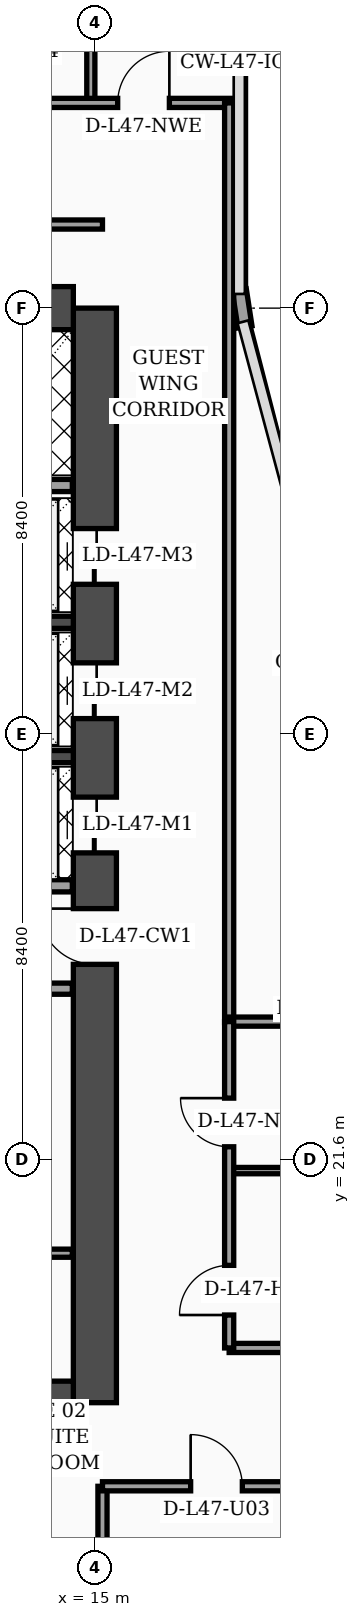
"""IFC4 building model, lengths in metres.
Left out: names, types, materials, properties, quantities, classifications, styles, units other than length and angle.
Written with IfcOpenShell. Run it as: python <this file> out.ifc"""

import sys

from ifc_helpers import new_model, si_unit, direction, frame, frame_2d, origin, place, context, subcontext, project, spatial, rectangle, extrude, element, fill, save


model = new_model("IFC4")
c1 = context("Model", 3, precision=1e-05, world=origin(), true_north=direction((0.0, 1.0)))
c2 = subcontext(c1, "Body", "Model", "MODEL_VIEW")
j1 = project(units=[si_unit("LENGTHUNIT", "METRE"), si_unit("PLANEANGLEUNIT", "RADIAN")], contexts=[c1])
p1 = place(None, origin())
s1 = spatial("IfcSite", under=j1, at=p1, CompositionType="ELEMENT")
p2 = place(p1, origin())
s2 = spatial("IfcBuilding", under=s1, at=p2, CompositionType="ELEMENT")
p3 = place(p2, frame((0.0, 0.0, 191.3)))
s3 = spatial("IfcBuildingStorey", under=s2, at=p3, CompositionType="ELEMENT", Elevation=191.3)
p4 = place(p3, frame((15.0, 16.8, 0.0), z_axis=(0.0, 0.0, 1.0), x_axis=(0.0, 1.0, 0.0)))
e1 = element("IfcWall", 1, at=p4, inside=s3, PredefinedType="SHEAR", context=c2, shape_type="SweptSolid", body=[
    extrude(rectangle(XDim=21.6, YDim=0.85, at=frame_2d((10.8, 0.0))), origin(), (0.0, 0.0, 1.0), 3.56),
])
p5 = place(p4, frame((8.65, 0.0, 0.0)))
e2 = element("IfcOpeningElement", 2, at=p5, cuts=e1, PredefinedType="OPENING", context=c2, shape_type="SweptSolid", body=[
    extrude(rectangle(XDim=1.1, YDim=2.2, at=frame_2d((0.55, 1.1))), frame((0.0, 0.435, 0.0), z_axis=(0.0, -1.0, 0.0), x_axis=(1.0, 0.0, 0.0)), (0.0, 0.0, 1.0), 0.87),
])
p6 = place(p4, frame((10.85, 0.0, 0.0)))
e3 = element("IfcOpeningElement", 3, at=p6, cuts=e1, PredefinedType="OPENING", context=c2, shape_type="SweptSolid", body=[
    extrude(rectangle(XDim=1.1, YDim=2.2, at=frame_2d((0.55, 1.1))), frame((0.0, 0.435, 0.0), z_axis=(0.0, -1.0, 0.0), x_axis=(1.0, 0.0, 0.0)), (0.0, 0.0, 1.0), 0.87),
])
p7 = place(p4, frame((13.5, 0.0, 0.0)))
e4 = element("IfcOpeningElement", 4, at=p7, cuts=e1, PredefinedType="OPENING", context=c2, shape_type="SweptSolid", body=[
    extrude(rectangle(XDim=1.1, YDim=2.2, at=frame_2d((0.55, 1.1))), frame((0.0, 0.435, 0.0), z_axis=(0.0, -1.0, 0.0), x_axis=(1.0, 0.0, 0.0)), (0.0, 0.0, 1.0), 0.87),
])
p8 = place(p4, frame((16.15, 0.0, 0.0)))
e5 = element("IfcOpeningElement", 5, at=p8, cuts=e1, PredefinedType="OPENING", context=c2, shape_type="SweptSolid", body=[
    extrude(rectangle(XDim=1.1, YDim=2.2, at=frame_2d((0.55, 1.1))), frame((0.0, 0.435, 0.0), z_axis=(0.0, -1.0, 0.0), x_axis=(1.0, 0.0, 0.0)), (0.0, 0.0, 1.0), 0.87),
])
for number, where, z_axis, x_axis in (
    (6, (4.625, 38.4, 0.0), (0.0, 0.0, 1.0), (1.0, 0.0, 0.0)),
    (7, (4.625, 16.8, 0.0), (0.0, 0.0, 1.0), (1.0, 0.0, 0.0)),
):
    element("IfcWall", number, at=place(p3, frame(where, z_axis=z_axis, x_axis=x_axis)), inside=s3, PredefinedType="SHEAR", context=c2, shape_type="SweptSolid", body=[
        extrude(rectangle(XDim=9.95, YDim=0.85, at=frame_2d((4.975, 0.0))), origin(), (0.0, 0.0, 1.0), 3.56),
    ])
for number, where, z_axis, x_axis in (
    (8, (12.18, 29.55, 0.0), (0.0, 0.0, 1.0), (1.0, 0.0, 0.0)),
    (9, (12.18, 32.2, 0.0), (0.0, 0.0, 1.0), (1.0, 0.0, 0.0)),
):
    element("IfcWall", number, at=place(p3, frame(where, z_axis=z_axis, x_axis=x_axis)), inside=s3, PredefinedType="SOLIDWALL", context=c2, shape_type="SweptSolid", body=[
        extrude(rectangle(XDim=2.395, YDim=0.24, at=frame_2d((1.198, 0.0))), origin(), (0.0, 0.0, 1.0), 3.56),
    ])
p9 = place(p3, frame((17.962, 38.03, 0.0), z_axis=(0.0, 0.0, 1.0), x_axis=(-0.15141125477, 0.988470855377, 0.0)))
e10 = element("IfcWall", 10, at=p9, inside=s3, PredefinedType="SOLIDWALL", context=c2, shape_type="SweptSolid", body=[
    extrude(rectangle(XDim=0.739, YDim=0.28, at=frame_2d((0.369, 0.0))), origin(), (0.0, 0.0, 1.0), 3.56),
])
p10 = place(p3, frame((9.68, 19.75, 0.0), z_axis=(0.0, 0.0, 1.0), x_axis=(1.0, 0.0, 0.0)))
e11 = element("IfcWall", 11, at=p10, inside=s3, PredefinedType="PARTITIONING", context=c2, shape_type="SweptSolid", body=[
    extrude(rectangle(XDim=4.875, YDim=0.16, at=frame_2d((2.438, 0.0))), origin(), (0.0, 0.0, 1.0), 3.56),
])
p11 = place(p10, frame((1.1, 0.0, 0.0)))
e12 = element("IfcOpeningElement", 12, at=p11, cuts=e11, PredefinedType="OPENING", context=c2, shape_type="SweptSolid", body=[
    extrude(rectangle(XDim=0.98, YDim=2.15, at=frame_2d((0.49, 1.075))), frame((0.0, 0.09, 0.0), z_axis=(0.0, -1.0, 0.0), x_axis=(1.0, 0.0, 0.0)), (0.0, 0.0, 1.0), 0.18),
])
p12 = place(p3, frame((9.68, 24.97, 0.0), z_axis=(0.0, 0.0, 1.0), x_axis=(1.0, 0.0, 0.0)))
e13 = element("IfcWall", 13, at=p12, inside=s3, PredefinedType="SOLIDWALL", context=c2, shape_type="SweptSolid", body=[
    extrude(rectangle(XDim=4.875, YDim=0.22, at=frame_2d((2.438, 0.0))), origin(), (0.0, 0.0, 1.0), 2.94),
])
p13 = place(p12, frame((0.9, 0.0, 0.0)))
e14 = element("IfcOpeningElement", 14, at=p13, cuts=e13, PredefinedType="OPENING", context=c2, shape_type="SweptSolid", body=[
    extrude(rectangle(XDim=0.98, YDim=2.15, at=frame_2d((0.49, 1.075))), frame((0.0, 0.12, 0.0), z_axis=(0.0, -1.0, 0.0), x_axis=(1.0, 0.0, 0.0)), (0.0, 0.0, 1.0), 0.24),
])
p14 = place(p3, frame((12.25, 27.0, 0.0), z_axis=(0.0, 0.0, 1.0), x_axis=(1.0, 0.0, 0.0)))
e15 = element("IfcWall", 15, at=p14, inside=s3, PredefinedType="SOLIDWALL", context=c2, shape_type="SweptSolid", body=[
    extrude(rectangle(XDim=2.305, YDim=0.24, at=frame_2d((1.152, 0.0))), origin(), (0.0, 0.0, 1.0), 3.56),
])
p15 = place(p3, frame((9.66, 34.9, 0.0), z_axis=(0.0, 0.0, 1.0), x_axis=(1.0, 0.0, 0.0)))
e16 = element("IfcWall", 16, at=p15, inside=s3, PredefinedType="SOLIDWALL", context=c2, shape_type="SweptSolid", body=[
    extrude(rectangle(XDim=4.895, YDim=0.24, at=frame_2d((2.448, 0.0))), origin(), (0.0, 0.0, 1.0), 3.56),
])
p16 = place(p3, frame((15.15, 2.44, 0.0), z_axis=(0.0, 0.0, 1.0), x_axis=(0.0, 1.0, 0.0)))
e17 = element("IfcWall", 17, at=p16, inside=s3, PredefinedType="PARTITIONING", context=c2, shape_type="SweptSolid", body=[
    extrude(rectangle(XDim=12.71, YDim=0.18, at=frame_2d((6.355, 0.0))), origin(), (0.0, 0.0, 1.0), 3.09),
])
p17 = place(p3, frame((15.15, 15.15, 0.0), z_axis=(0.0, 0.0, 1.0), x_axis=(1.0, 0.0, 0.0)))
e18 = element("IfcWall", 18, at=p17, inside=s3, PredefinedType="PARTITIONING", context=c2, shape_type="SweptSolid", body=[
    extrude(rectangle(XDim=6.45, YDim=0.18, at=frame_2d((3.225, 0.0))), origin(), (0.0, 0.0, 1.0), 2.49),
])
p18 = place(p17, frame((1.74, 0.0, 0.0)))
e19 = element("IfcOpeningElement", 19, at=p18, cuts=e18, PredefinedType="OPENING", context=c2, shape_type="SweptSolid", body=[
    extrude(rectangle(XDim=1.02, YDim=2.2, at=frame_2d((0.51, 1.1))), frame((0.0, 0.1, 0.0), z_axis=(0.0, -1.0, 0.0), x_axis=(1.0, 0.0, 0.0)), (0.0, 0.0, 1.0), 0.2),
])
p19 = place(p3, frame((14.92, 42.45, 0.0), z_axis=(0.0, 0.0, 1.0), x_axis=(0.0, 1.0, 0.0)))
e20 = element("IfcWall", 20, at=p19, inside=s3, PredefinedType="PARTITIONING", context=c2, shape_type="SweptSolid", body=[
    extrude(rectangle(XDim=5.35, YDim=0.16, at=frame_2d((2.675, 0.0))), origin(), (0.0, 0.0, 1.0), 3.09),
])
p20 = place(p3, frame((0.08, 42.45, 0.0), z_axis=(0.0, 0.0, 1.0), x_axis=(1.0, 0.0, 0.0)))
e21 = element("IfcWall", 21, at=p20, inside=s3, PredefinedType="PARTITIONING", context=c2, shape_type="SweptSolid", body=[
    extrude(rectangle(XDim=17.77, YDim=0.18, at=frame_2d((8.885, 0.0))), origin(), (0.0, 0.0, 1.0), 2.94),
])
p21 = place(p20, frame((0.9, 0.0, 0.0)))
e22 = element("IfcOpeningElement", 22, at=p21, cuts=e21, PredefinedType="OPENING", context=c2, shape_type="SweptSolid", body=[
    extrude(rectangle(XDim=1.02, YDim=2.2, at=frame_2d((0.51, 1.1))), frame((0.0, 0.1, 0.0), z_axis=(0.0, -1.0, 0.0), x_axis=(1.0, 0.0, 0.0)), (0.0, 0.0, 1.0), 0.2),
])
p22 = place(p20, frame((7.38, 0.0, 0.0)))
e23 = element("IfcOpeningElement", 23, at=p22, cuts=e21, PredefinedType="OPENING", context=c2, shape_type="SweptSolid", body=[
    extrude(rectangle(XDim=1.02, YDim=2.2, at=frame_2d((0.51, 1.1))), frame((0.0, 0.1, 0.0), z_axis=(0.0, -1.0, 0.0), x_axis=(1.0, 0.0, 0.0)), (0.0, 0.0, 1.0), 0.2),
])
p23 = place(p20, frame((15.37, 0.0, 0.0)))
e24 = element("IfcOpeningElement", 24, at=p23, cuts=e21, PredefinedType="OPENING", context=c2, shape_type="SweptSolid", body=[
    extrude(rectangle(XDim=1.02, YDim=2.2, at=frame_2d((0.51, 1.1))), frame((0.0, 0.1, 0.0), z_axis=(0.0, -1.0, 0.0), x_axis=(1.0, 0.0, 0.0)), (0.0, 0.0, 1.0), 0.2),
])
p24 = place(p3, frame((17.65, 24.3, 0.0), z_axis=(0.0, 0.0, 1.0), x_axis=(0.0, 1.0, 0.0)))
e25 = element("IfcWall", 25, at=p24, inside=s3, PredefinedType="PARTITIONING", context=c2, shape_type="SweptSolid", body=[
    extrude(rectangle(XDim=18.15, YDim=0.18, at=frame_2d((9.075, 0.0))), origin(), (0.0, 0.0, 1.0), 2.94),
])
p25 = place(p3, frame((3.755, 40.05, 0.0), z_axis=(0.0, 0.0, 1.0), x_axis=(1.0, 0.0, 0.0)))
e26 = element("IfcWall", 26, at=p25, inside=s3, PredefinedType="PARTITIONING", context=c2, shape_type="SweptSolid", body=[
    extrude(rectangle(XDim=11.395, YDim=0.18, at=frame_2d((5.698, 0.0))), origin(), (0.0, 0.0, 1.0), 2.94),
])
p26 = place(p3, frame((17.65, 17.88, 0.0), z_axis=(0.0, 0.0, 1.0), x_axis=(1.0, 0.0, 0.0)))
e27 = element("IfcWall", 27, at=p26, inside=s3, PredefinedType="PARTITIONING", context=c2, shape_type="SweptSolid", body=[
    extrude(rectangle(XDim=3.9, YDim=0.18, at=frame_2d((1.95, 0.0))), origin(), (0.0, 0.0, 1.0), 3.56),
])
p27 = place(p3, frame((17.65, 21.38, 0.0), z_axis=(0.0, 0.0, 1.0), x_axis=(1.0, 0.0, 0.0)))
e28 = element("IfcWall", 28, at=p27, inside=s3, PredefinedType="PARTITIONING", context=c2, shape_type="SweptSolid", body=[
    extrude(rectangle(XDim=3.9, YDim=0.125, at=frame_2d((1.95, 0.0))), origin(), (0.0, 0.0, 1.0), 3.56),
])
p28 = place(p3, frame((17.65, 24.32, 0.0), z_axis=(0.0, 0.0, 1.0), x_axis=(1.0, 0.0, 0.0)))
e29 = element("IfcWall", 29, at=p28, inside=s3, PredefinedType="PARTITIONING", context=c2, shape_type="SweptSolid", body=[
    extrude(rectangle(XDim=3.95, YDim=0.18, at=frame_2d((1.975, 0.0))), origin(), (0.0, 0.0, 1.0), 3.56),
])
p29 = place(p3, frame((17.65, 17.88, 0.0), z_axis=(0.0, 0.0, 1.0), x_axis=(0.0, 1.0, 0.0)))
e30 = element("IfcWall", 30, at=p29, inside=s3, PredefinedType="PARTITIONING", context=c2, shape_type="SweptSolid", body=[
    extrude(rectangle(XDim=6.44, YDim=0.18, at=frame_2d((3.22, 0.0))), origin(), (0.0, 0.0, 1.0), 3.56),
])
p30 = place(p29, frame((0.65, 0.0, 0.0)))
e31 = element("IfcOpeningElement", 31, at=p30, cuts=e30, PredefinedType="OPENING", context=c2, shape_type="SweptSolid", body=[
    extrude(rectangle(XDim=0.98, YDim=2.15, at=frame_2d((0.49, 1.075))), frame((0.0, 0.1, 0.0), z_axis=(0.0, -1.0, 0.0), x_axis=(1.0, 0.0, 0.0)), (0.0, 0.0, 1.0), 0.2),
])
p31 = place(p29, frame((3.97, 0.0, 0.0)))
e32 = element("IfcOpeningElement", 32, at=p31, cuts=e30, PredefinedType="OPENING", context=c2, shape_type="SweptSolid", body=[
    extrude(rectangle(XDim=0.96, YDim=2.2, at=frame_2d((0.48, 1.1))), frame((0.0, 0.1, 0.0), z_axis=(0.0, -1.0, 0.0), x_axis=(1.0, 0.0, 0.0)), (0.0, 0.0, 1.0), 0.2),
])
p32 = place(p18, origin())
e33 = element("IfcDoor", 33, at=p32, inside=s3, OperationType="SINGLE_SWING_LEFT", PredefinedType="DOOR", context=c2, shape_type="SweptSolid", body=[
    extrude(rectangle(XDim=1.02, YDim=2.2, at=frame_2d((0.51, 1.1))), frame((0.0, 0.025, 0.0), z_axis=(0.0, -1.0, 0.0), x_axis=(1.0, 0.0, 0.0)), (0.0, 0.0, 1.0), 0.05),
])
fill(e19, e33)
p33 = place(p23, origin())
e34 = element("IfcDoor", 34, at=p33, inside=s3, OperationType="SINGLE_SWING_RIGHT", PredefinedType="DOOR", context=c2, shape_type="SweptSolid", body=[
    extrude(rectangle(XDim=1.02, YDim=2.2, at=frame_2d((0.51, 1.1))), frame((0.0, 0.025, 0.0), z_axis=(0.0, -1.0, 0.0), x_axis=(1.0, 0.0, 0.0)), (0.0, 0.0, 1.0), 0.05),
])
fill(e24, e34)
p34 = place(p30, origin())
e35 = element("IfcDoor", 35, at=p34, inside=s3, OperationType="SINGLE_SWING_LEFT", PredefinedType="DOOR", context=c2, shape_type="SweptSolid", body=[
    extrude(rectangle(XDim=0.98, YDim=2.15, at=frame_2d((0.49, 1.075))), frame((0.0, 0.025, 0.0), z_axis=(0.0, -1.0, 0.0), x_axis=(1.0, 0.0, 0.0)), (0.0, 0.0, 1.0), 0.05),
])
fill(e31, e35)
p35 = place(p31, origin())
e36 = element("IfcDoor", 36, at=p35, inside=s3, OperationType="SINGLE_SWING_RIGHT", PredefinedType="DOOR", context=c2, shape_type="SweptSolid", body=[
    extrude(rectangle(XDim=0.96, YDim=2.2, at=frame_2d((0.48, 1.1))), frame((0.0, 0.025, 0.0), z_axis=(0.0, -1.0, 0.0), x_axis=(1.0, 0.0, 0.0)), (0.0, 0.0, 1.0), 0.05),
])
fill(e32, e36)
p36 = place(p5, origin())
e37 = element("IfcDoor", 37, at=p36, inside=s3, OperationType="SINGLE_SWING_RIGHT", PredefinedType="DOOR", context=c2, shape_type="SweptSolid", body=[
    extrude(rectangle(XDim=1.1, YDim=2.2, at=frame_2d((0.55, 1.1))), frame((0.0, 0.025, 0.0), z_axis=(0.0, -1.0, 0.0), x_axis=(1.0, 0.0, 0.0)), (0.0, 0.0, 1.0), 0.05),
])
fill(e2, e37)
p37 = place(p6, origin())
e38 = element("IfcDoor", 38, at=p37, inside=s3, OperationType="DOUBLE_DOOR_SLIDING", PredefinedType="DOOR", context=c2, shape_type="SweptSolid", body=[
    extrude(rectangle(XDim=1.1, YDim=2.2, at=frame_2d((0.55, 1.1))), frame((0.0, 0.025, 0.0), z_axis=(0.0, -1.0, 0.0), x_axis=(1.0, 0.0, 0.0)), (0.0, 0.0, 1.0), 0.05),
])
fill(e3, e38)
p38 = place(p7, origin())
e39 = element("IfcDoor", 39, at=p38, inside=s3, OperationType="DOUBLE_DOOR_SLIDING", PredefinedType="DOOR", context=c2, shape_type="SweptSolid", body=[
    extrude(rectangle(XDim=1.1, YDim=2.2, at=frame_2d((0.55, 1.1))), frame((0.0, 0.025, 0.0), z_axis=(0.0, -1.0, 0.0), x_axis=(1.0, 0.0, 0.0)), (0.0, 0.0, 1.0), 0.05),
])
fill(e4, e39)
p39 = place(p8, origin())
e40 = element("IfcDoor", 40, at=p39, inside=s3, OperationType="DOUBLE_DOOR_SLIDING", PredefinedType="DOOR", context=c2, shape_type="SweptSolid", body=[
    extrude(rectangle(XDim=1.1, YDim=2.2, at=frame_2d((0.55, 1.1))), frame((0.0, 0.025, 0.0), z_axis=(0.0, -1.0, 0.0), x_axis=(1.0, 0.0, 0.0)), (0.0, 0.0, 1.0), 0.05),
])
fill(e5, e40)
save(model, sys.argv[1])
